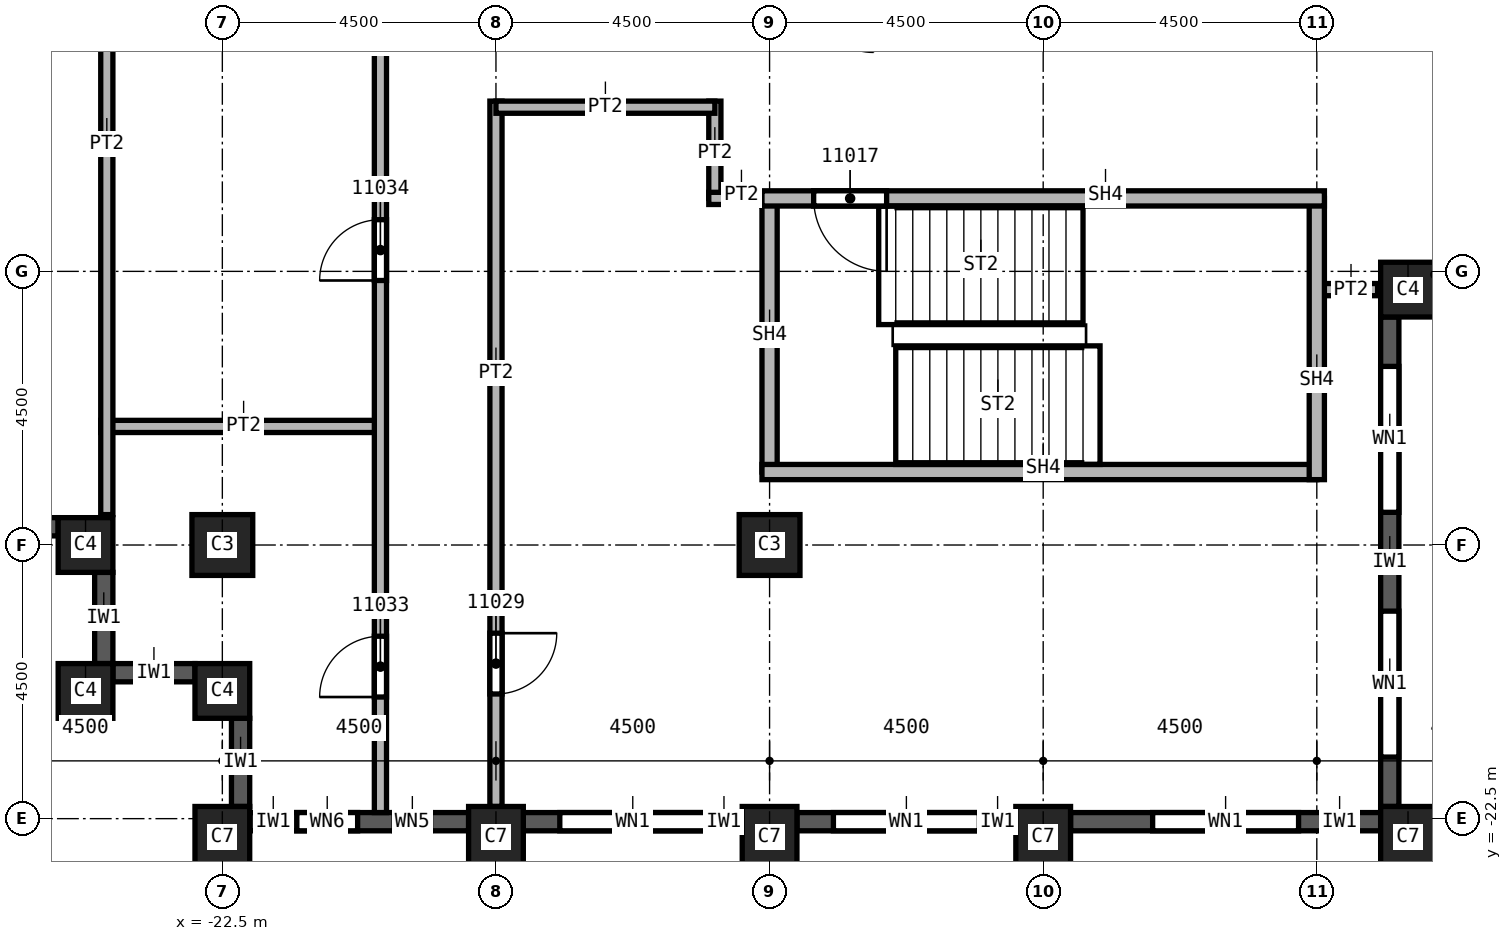
"""IFC4 building model, lengths in metres.
Left out: names, types, materials, properties, quantities, classifications, styles, units other than length and angle.
Written with IfcOpenShell. Run it as: python <this file> out.ifc"""

import sys

from ifc_helpers import new_model, si_unit, direction, frame, frame_2d, origin, origin_2d, place, context, subcontext, project, spatial, rectangle, extrude, element, fill, save


model = new_model("IFC4")
c1 = context("Model", 3, precision=1e-05, world=origin(), true_north=direction((0.0, 1.0)))
c2 = subcontext(c1, "Body", "Model", "MODEL_VIEW")
j1 = project(units=[si_unit("LENGTHUNIT", "METRE"), si_unit("PLANEANGLEUNIT", "RADIAN")], contexts=[c1])
p1 = place(None, origin())
s1 = spatial("IfcSite", under=j1, at=p1, CompositionType="ELEMENT")
p2 = place(p1, origin())
s2 = spatial("IfcBuilding", under=s1, at=p2, CompositionType="ELEMENT")
p3 = place(p2, frame((0.0, 0.0, 188.0)))
s3 = spatial("IfcBuildingStorey", under=s2, at=p3, CompositionType="ELEMENT", Elevation=188.0)
for number, where, z_axis, x_axis in (
    (1, (-13.5, -18.0, 0.0), (0.0, 0.0, 1.0), (1.0, 0.0, 0.0)),
    (2, (-22.5, -18.0, 0.0), (0.0, 0.0, 1.0), (1.0, 0.0, 0.0)),
):
    element("IfcColumn", number, at=place(p3, frame(where, z_axis=z_axis, x_axis=x_axis)), inside=s3, PredefinedType="COLUMN", context=c2, shape_type="SweptSolid", body=[
        extrude(rectangle(XDim=1.0, YDim=1.0, at=origin_2d()), origin(), (0.0, 0.0, 1.0), 3.72),
    ])
for number, where, z_axis, x_axis in (
    (3, (-3.0, -22.8, 0.0), (0.0, 0.0, 1.0), (1.0, 0.0, 0.0)),
    (4, (-9.0, -22.8, 0.0), (0.0, 0.0, 1.0), (1.0, 0.0, 0.0)),
    (5, (-13.5, -22.8, 0.0), (0.0, 0.0, 1.0), (1.0, 0.0, 0.0)),
    (6, (-18.0, -22.8, 0.0), (0.0, 0.0, 1.0), (1.0, 0.0, 0.0)),
    (7, (-22.5, -22.8, 0.0), (0.0, 0.0, 1.0), (1.0, 0.0, 0.0)),
):
    element("IfcColumn", number, at=place(p3, frame(where, z_axis=z_axis, x_axis=x_axis)), inside=s3, PredefinedType="COLUMN", context=c2, shape_type="SweptSolid", body=[
        extrude(rectangle(XDim=0.9, YDim=1.0, at=origin_2d()), origin(), (0.0, 0.0, 1.0), 3.72),
    ])
for number, where, z_axis, x_axis in (
    (8, (-3.0, -13.8, 0.0), (0.0, 0.0, 1.0), (1.0, 0.0, 0.0)),
    (9, (-22.5, -20.4, 0.0), (0.0, 0.0, 1.0), (1.0, 0.0, 0.0)),
    (10, (-24.75, -20.4, 0.0), (0.0, 0.0, 1.0), (1.0, 0.0, 0.0)),
    (11, (-24.75, -18.0, 0.0), (0.0, 0.0, 1.0), (1.0, 0.0, 0.0)),
):
    element("IfcColumn", number, at=place(p3, frame(where, z_axis=z_axis, x_axis=x_axis)), inside=s3, PredefinedType="COLUMN", context=c2, shape_type="SweptSolid", body=[
        extrude(rectangle(XDim=0.9, YDim=0.9, at=origin_2d()), origin(), (0.0, 0.0, 1.0), 3.72),
    ])
p4 = place(p3, frame((-26.55, -17.7, 0.0), z_axis=(0.0, 0.0, 1.0), x_axis=(1.0, 0.0, 0.0)))
e12 = element("IfcWall", 12, at=p4, inside=s3, PredefinedType="SOLIDWALL", context=c2, shape_type="SweptSolid", body=[
    extrude(rectangle(XDim=1.35, YDim=0.3, at=frame_2d((0.675, 0.0))), origin(), (0.0, 0.0, 1.0), 3.12),
])
p5 = place(p3, frame((-24.45, -18.45, 0.0), z_axis=(0.0, 0.0, 1.0), x_axis=(0.0, -1.0, 0.0)))
e13 = element("IfcWall", 13, at=p5, inside=s3, PredefinedType="SOLIDWALL", context=c2, shape_type="SweptSolid", body=[
    extrude(rectangle(XDim=1.5, YDim=0.3, at=frame_2d((0.75, 0.0))), origin(), (0.0, 0.0, 1.0), 3.12),
])
p6 = place(p3, frame((-24.3, -20.1, 0.0), z_axis=(0.0, 0.0, 1.0), x_axis=(1.0, 0.0, 0.0)))
e14 = element("IfcWall", 14, at=p6, inside=s3, PredefinedType="SOLIDWALL", context=c2, shape_type="SweptSolid", body=[
    extrude(rectangle(XDim=1.35, YDim=0.3, at=frame_2d((0.675, 0.0))), origin(), (0.0, 0.0, 1.0), 3.12),
])
p7 = place(p3, frame((-22.2, -20.85, 0.0), z_axis=(0.0, 0.0, 1.0), x_axis=(0.0, -1.0, 0.0)))
e15 = element("IfcWall", 15, at=p7, inside=s3, PredefinedType="SOLIDWALL", context=c2, shape_type="SweptSolid", body=[
    extrude(rectangle(XDim=1.45, YDim=0.3, at=frame_2d((0.725, 0.0))), origin(), (0.0, 0.0, 1.0), 3.12),
])
p8 = place(p3, frame((-22.05, -22.55, 0.0), z_axis=(0.0, 0.0, 1.0), x_axis=(1.0, 0.0, 0.0)))
e16 = element("IfcWall", 16, at=p8, inside=s3, PredefinedType="SOLIDWALL", context=c2, shape_type="SweptSolid", body=[
    extrude(rectangle(XDim=3.6, YDim=0.3, at=frame_2d((1.8, 0.0))), origin(), (0.0, 0.0, 1.0), 3.12),
])
p9 = place(p8, frame((0.775, 0.0, 0.8)))
e17 = element("IfcOpeningElement", 17, at=p9, cuts=e16, PredefinedType="OPENING", context=c2, shape_type="SweptSolid", body=[
    extrude(rectangle(XDim=1.0, YDim=1.95, at=frame_2d((0.5, 0.975))), frame((0.0, 0.15, 0.0), z_axis=(0.0, -1.0, 0.0), x_axis=(1.0, 0.0, 0.0)), (0.0, 0.0, 1.0), 0.3),
])
p10 = place(p8, frame((2.375, 0.0, 0.8)))
e18 = element("IfcOpeningElement", 18, at=p10, cuts=e16, PredefinedType="OPENING", context=c2, shape_type="SweptSolid", body=[
    extrude(rectangle(XDim=0.6, YDim=1.95, at=frame_2d((0.3, 0.975))), frame((0.0, 0.15, 0.0), z_axis=(0.0, -1.0, 0.0), x_axis=(1.0, 0.0, 0.0)), (0.0, 0.0, 1.0), 0.3),
])
p11 = place(p3, frame((-17.55, -22.55, 0.0), z_axis=(0.0, 0.0, 1.0), x_axis=(1.0, 0.0, 0.0)))
e19 = element("IfcWall", 19, at=p11, inside=s3, PredefinedType="SOLIDWALL", context=c2, shape_type="SweptSolid", body=[
    extrude(rectangle(XDim=3.6, YDim=0.3, at=frame_2d((1.8, 0.0))), origin(), (0.0, 0.0, 1.0), 3.12),
])
p12 = place(p11, frame((0.6, 0.0, 0.8)))
e20 = element("IfcOpeningElement", 20, at=p12, cuts=e19, PredefinedType="OPENING", context=c2, shape_type="SweptSolid", body=[
    extrude(rectangle(XDim=2.4, YDim=1.95, at=frame_2d((1.2, 0.975))), frame((0.0, 0.15, 0.0), z_axis=(0.0, -1.0, 0.0), x_axis=(1.0, 0.0, 0.0)), (0.0, 0.0, 1.0), 0.3),
])
p13 = place(p3, frame((-13.05, -22.55, 0.0), z_axis=(0.0, 0.0, 1.0), x_axis=(1.0, 0.0, 0.0)))
e21 = element("IfcWall", 21, at=p13, inside=s3, PredefinedType="SOLIDWALL", context=c2, shape_type="SweptSolid", body=[
    extrude(rectangle(XDim=3.6, YDim=0.3, at=frame_2d((1.8, 0.0))), origin(), (0.0, 0.0, 1.0), 3.12),
])
p14 = place(p13, frame((0.6, 0.0, 0.8)))
e22 = element("IfcOpeningElement", 22, at=p14, cuts=e21, PredefinedType="OPENING", context=c2, shape_type="SweptSolid", body=[
    extrude(rectangle(XDim=2.4, YDim=1.95, at=frame_2d((1.2, 0.975))), frame((0.0, 0.15, 0.0), z_axis=(0.0, -1.0, 0.0), x_axis=(1.0, 0.0, 0.0)), (0.0, 0.0, 1.0), 0.3),
])
p15 = place(p3, frame((-8.55, -22.55, 0.0), z_axis=(0.0, 0.0, 1.0), x_axis=(1.0, 0.0, 0.0)))
e23 = element("IfcWall", 23, at=p15, inside=s3, PredefinedType="SOLIDWALL", context=c2, shape_type="SweptSolid", body=[
    extrude(rectangle(XDim=5.1, YDim=0.3, at=frame_2d((2.55, 0.0))), origin(), (0.0, 0.0, 1.0), 3.12),
])
p16 = place(p15, frame((1.35, 0.0, 0.8)))
e24 = element("IfcOpeningElement", 24, at=p16, cuts=e23, PredefinedType="OPENING", context=c2, shape_type="SweptSolid", body=[
    extrude(rectangle(XDim=2.4, YDim=1.95, at=frame_2d((1.2, 0.975))), frame((0.0, 0.15, 0.0), z_axis=(0.0, -1.0, 0.0), x_axis=(1.0, 0.0, 0.0)), (0.0, 0.0, 1.0), 0.3),
])
p17 = place(p3, frame((-3.3, -22.3, 0.0), z_axis=(0.0, 0.0, 1.0), x_axis=(0.0, 1.0, 0.0)))
e25 = element("IfcWall", 25, at=p17, inside=s3, PredefinedType="SOLIDWALL", context=c2, shape_type="SweptSolid", body=[
    extrude(rectangle(XDim=8.05, YDim=0.3, at=frame_2d((4.025, 0.0))), origin(), (0.0, 0.0, 1.0), 3.12),
])
p18 = place(p17, frame((0.812, 0.0, 0.8)))
e26 = element("IfcOpeningElement", 26, at=p18, cuts=e25, PredefinedType="OPENING", context=c2, shape_type="SweptSolid", body=[
    extrude(rectangle(XDim=2.4, YDim=1.95, at=frame_2d((1.2, 0.975))), frame((0.0, 0.15, 0.0), z_axis=(0.0, -1.0, 0.0), x_axis=(1.0, 0.0, 0.0)), (0.0, 0.0, 1.0), 0.3),
])
p19 = place(p17, frame((4.837, 0.0, 0.8)))
e27 = element("IfcOpeningElement", 27, at=p19, cuts=e25, PredefinedType="OPENING", context=c2, shape_type="SweptSolid", body=[
    extrude(rectangle(XDim=2.4, YDim=1.95, at=frame_2d((1.2, 0.975))), frame((0.0, 0.15, 0.0), z_axis=(0.0, -1.0, 0.0), x_axis=(1.0, 0.0, 0.0)), (0.0, 0.0, 1.0), 0.3),
])
p20 = place(p3, frame((-24.5, -16.05, 0.0), z_axis=(0.0, 0.0, 1.0), x_axis=(1.0, 0.0, 0.0)))
e28 = element("IfcWall", 28, at=p20, inside=s3, PredefinedType="PARTITIONING", context=c2, shape_type="SweptSolid", body=[
    extrude(rectangle(XDim=4.6, YDim=0.2, at=frame_2d((2.3, 0.0))), origin(), (0.0, 0.0, 1.0), 3.72),
])
p21 = place(p3, frame((-24.4, -17.5, 0.0), z_axis=(0.0, 0.0, 1.0), x_axis=(0.0, 1.0, 0.0)))
e29 = element("IfcWall", 29, at=p21, inside=s3, PredefinedType="PARTITIONING", context=c2, shape_type="SweptSolid", body=[
    extrude(rectangle(XDim=10.85, YDim=0.2, at=frame_2d((5.425, 0.0))), origin(), (0.0, 0.0, 1.0), 3.72),
])
p22 = place(p3, frame((-19.9, -22.4, 0.0), z_axis=(0.0, 0.0, 1.0), x_axis=(0.0, 1.0, 0.0)))
e30 = element("IfcWall", 30, at=p22, inside=s3, PredefinedType="PARTITIONING", context=c2, shape_type="SweptSolid", body=[
    extrude(rectangle(XDim=23.25, YDim=0.2, at=frame_2d((11.625, 0.0))), origin(), (0.0, 0.0, 1.0), 3.72),
])
p23 = place(p22, frame((1.9, 0.0, 0.0)))
e31 = element("IfcOpeningElement", 31, at=p23, cuts=e30, PredefinedType="OPENING", context=c2, shape_type="SweptSolid", body=[
    extrude(rectangle(XDim=1.0, YDim=2.1, at=frame_2d((0.5, 1.05))), frame((0.0, 0.1, 0.0), z_axis=(0.0, -1.0, 0.0), x_axis=(1.0, 0.0, 0.0)), (0.0, 0.0, 1.0), 0.2),
])
p24 = place(p22, frame((8.75, 0.0, 0.0)))
e32 = element("IfcOpeningElement", 32, at=p24, cuts=e30, PredefinedType="OPENING", context=c2, shape_type="SweptSolid", body=[
    extrude(rectangle(XDim=1.0, YDim=2.1, at=frame_2d((0.5, 1.05))), frame((0.0, 0.1, 0.0), z_axis=(0.0, -1.0, 0.0), x_axis=(1.0, 0.0, 0.0)), (0.0, 0.0, 1.0), 0.2),
])
p25 = place(p22, frame((16.25, 0.0, 0.0)))
e33 = element("IfcOpeningElement", 33, at=p25, cuts=e30, PredefinedType="OPENING", context=c2, shape_type="SweptSolid", body=[
    extrude(rectangle(XDim=1.0, YDim=2.1, at=frame_2d((0.5, 1.05))), frame((0.0, 0.1, 0.0), z_axis=(0.0, -1.0, 0.0), x_axis=(1.0, 0.0, 0.0)), (0.0, 0.0, 1.0), 0.2),
])
p26 = place(p3, frame((-18.0, -10.7, 0.0), z_axis=(0.0, 0.0, 1.0), x_axis=(0.0, -1.0, 0.0)))
e34 = element("IfcWall", 34, at=p26, inside=s3, PredefinedType="PARTITIONING", context=c2, shape_type="SweptSolid", body=[
    extrude(rectangle(XDim=11.6, YDim=0.2, at=frame_2d((5.8, 0.0))), origin(), (0.0, 0.0, 1.0), 3.72),
])
p27 = place(p26, frame((8.75, 0.0, 0.0)))
e35 = element("IfcOpeningElement", 35, at=p27, cuts=e34, PredefinedType="OPENING", context=c2, shape_type="SweptSolid", body=[
    extrude(rectangle(XDim=1.0, YDim=2.1, at=frame_2d((0.5, 1.05))), frame((0.0, 0.1, 0.0), z_axis=(0.0, -1.0, 0.0), x_axis=(1.0, 0.0, 0.0)), (0.0, 0.0, 1.0), 0.2),
])
p28 = place(p3, frame((-14.4, -12.3, 0.0), z_axis=(0.0, 0.0, 1.0), x_axis=(0.0, 1.0, 0.0)))
e36 = element("IfcWall", 36, at=p28, inside=s3, PredefinedType="PARTITIONING", context=c2, shape_type="SweptSolid", body=[
    extrude(rectangle(XDim=1.6, YDim=0.2, at=frame_2d((0.8, 0.0))), origin(), (0.0, 0.0, 1.0), 3.72),
])
p29 = place(p3, frame((-14.4, -10.8, 0.0), z_axis=(0.0, 0.0, 1.0), x_axis=(-1.0, 0.0, 0.0)))
e37 = element("IfcWall", 37, at=p29, inside=s3, PredefinedType="PARTITIONING", context=c2, shape_type="SweptSolid", body=[
    extrude(rectangle(XDim=3.6, YDim=0.2, at=frame_2d((1.8, 0.0))), origin(), (0.0, 0.0, 1.0), 3.72),
])
p30 = place(p3, frame((-13.375, -12.3, 0.0), z_axis=(0.0, 0.0, 1.0), x_axis=(-1.0, 0.0, 0.0)))
e38 = element("IfcWall", 38, at=p30, inside=s3, PredefinedType="PARTITIONING", context=c2, shape_type="SweptSolid", body=[
    extrude(rectangle(XDim=1.125, YDim=0.2, at=frame_2d((0.562, 0.0))), origin(), (0.0, 0.0, 1.0), 3.72),
])
p31 = place(p3, frame((-3.5, -13.8, 0.0), z_axis=(0.0, 0.0, 1.0), x_axis=(-1.0, 0.0, 0.0)))
e39 = element("IfcWall", 39, at=p31, inside=s3, PredefinedType="PARTITIONING", context=c2, shape_type="SweptSolid", body=[
    extrude(rectangle(XDim=1.0, YDim=0.2, at=frame_2d((0.5, 0.0))), origin(), (0.0, 0.0, 1.0), 3.72),
])
p32 = place(p3, frame((-13.5, -16.8, 0.0), z_axis=(0.0, 0.0, 1.0), x_axis=(0.0, 1.0, 0.0)))
e40 = element("IfcWall", 40, at=p32, inside=s3, PredefinedType="SOLIDWALL", context=c2, shape_type="SweptSolid", body=[
    extrude(rectangle(XDim=4.5, YDim=0.25, at=frame_2d((2.25, 0.0))), origin(), (0.0, 0.0, 1.0), 3.72),
])
p33 = place(p3, frame((-4.5, -16.8, 0.0), z_axis=(0.0, 0.0, 1.0), x_axis=(-1.0, 0.0, 0.0)))
e41 = element("IfcWall", 41, at=p33, inside=s3, PredefinedType="SOLIDWALL", context=c2, shape_type="SweptSolid", body=[
    extrude(rectangle(XDim=9.125, YDim=0.25, at=frame_2d((4.562, 0.0))), origin(), (0.0, 0.0, 1.0), 3.72),
])
p34 = place(p3, frame((-4.5, -12.3, 0.0), z_axis=(0.0, 0.0, 1.0), x_axis=(0.0, -1.0, 0.0)))
e42 = element("IfcWall", 42, at=p34, inside=s3, PredefinedType="SOLIDWALL", context=c2, shape_type="SweptSolid", body=[
    extrude(rectangle(XDim=4.625, YDim=0.25, at=frame_2d((2.312, 0.0))), origin(), (0.0, 0.0, 1.0), 3.72),
])
p35 = place(p3, frame((-4.375, -12.3, 0.0), z_axis=(0.0, 0.0, 1.0), x_axis=(-1.0, 0.0, 0.0)))
e43 = element("IfcWall", 43, at=p35, inside=s3, PredefinedType="SOLIDWALL", context=c2, shape_type="SweptSolid", body=[
    extrude(rectangle(XDim=9.25, YDim=0.25, at=frame_2d((4.625, 0.0))), origin(), (0.0, 0.0, 1.0), 3.72),
])
p36 = place(p35, frame((7.2, 0.0, 0.0)))
e44 = element("IfcOpeningElement", 44, at=p36, cuts=e43, PredefinedType="OPENING", context=c2, shape_type="SweptSolid", body=[
    extrude(rectangle(XDim=1.2, YDim=2.1, at=frame_2d((0.6, 1.05))), frame((0.0, 0.125, 0.0), z_axis=(0.0, -1.0, 0.0), x_axis=(1.0, 0.0, 0.0)), (0.0, 0.0, 1.0), 0.25),
])
p37 = place(p12, origin())
e45 = element("IfcWindow", 45, at=p37, inside=s3, PartitioningType="SINGLE_PANEL", PredefinedType="WINDOW", context=c2, shape_type="SweptSolid", body=[
    extrude(rectangle(XDim=2.4, YDim=1.95, at=frame_2d((1.2, 0.975))), frame((0.0, 0.03, 0.0), z_axis=(0.0, -1.0, 0.0), x_axis=(1.0, 0.0, 0.0)), (0.0, 0.0, 1.0), 0.06),
])
fill(e20, e45)
p38 = place(p14, origin())
e46 = element("IfcWindow", 46, at=p38, inside=s3, PartitioningType="SINGLE_PANEL", PredefinedType="WINDOW", context=c2, shape_type="SweptSolid", body=[
    extrude(rectangle(XDim=2.4, YDim=1.95, at=frame_2d((1.2, 0.975))), frame((0.0, 0.03, 0.0), z_axis=(0.0, -1.0, 0.0), x_axis=(1.0, 0.0, 0.0)), (0.0, 0.0, 1.0), 0.06),
])
fill(e22, e46)
p39 = place(p16, origin())
e47 = element("IfcWindow", 47, at=p39, inside=s3, PartitioningType="SINGLE_PANEL", PredefinedType="WINDOW", context=c2, shape_type="SweptSolid", body=[
    extrude(rectangle(XDim=2.4, YDim=1.95, at=frame_2d((1.2, 0.975))), frame((0.0, 0.03, 0.0), z_axis=(0.0, -1.0, 0.0), x_axis=(1.0, 0.0, 0.0)), (0.0, 0.0, 1.0), 0.06),
])
fill(e24, e47)
p40 = place(p18, origin())
e48 = element("IfcWindow", 48, at=p40, inside=s3, PartitioningType="SINGLE_PANEL", PredefinedType="WINDOW", context=c2, shape_type="SweptSolid", body=[
    extrude(rectangle(XDim=2.4, YDim=1.95, at=frame_2d((1.2, 0.975))), frame((0.0, 0.03, 0.0), z_axis=(0.0, -1.0, 0.0), x_axis=(1.0, 0.0, 0.0)), (0.0, 0.0, 1.0), 0.06),
])
fill(e26, e48)
p41 = place(p19, origin())
e49 = element("IfcWindow", 49, at=p41, inside=s3, PartitioningType="SINGLE_PANEL", PredefinedType="WINDOW", context=c2, shape_type="SweptSolid", body=[
    extrude(rectangle(XDim=2.4, YDim=1.95, at=frame_2d((1.2, 0.975))), frame((0.0, 0.03, 0.0), z_axis=(0.0, -1.0, 0.0), x_axis=(1.0, 0.0, 0.0)), (0.0, 0.0, 1.0), 0.06),
])
fill(e27, e49)
p42 = place(p36, origin())
e50 = element("IfcDoor", 50, at=p42, inside=s3, OperationType="SINGLE_SWING_RIGHT", PredefinedType="DOOR", context=c2, shape_type="SweptSolid", body=[
    extrude(rectangle(XDim=1.2, YDim=2.1, at=frame_2d((0.6, 1.05))), frame((0.0, 0.025, 0.0), z_axis=(0.0, -1.0, 0.0), x_axis=(1.0, 0.0, 0.0)), (0.0, 0.0, 1.0), 0.05),
])
fill(e44, e50)
p43 = place(p27, origin())
e51 = element("IfcDoor", 51, at=p43, inside=s3, OperationType="SINGLE_SWING_RIGHT", PredefinedType="DOOR", context=c2, shape_type="SweptSolid", body=[
    extrude(rectangle(XDim=1.0, YDim=2.1, at=frame_2d((0.5, 1.05))), frame((0.0, 0.025, 0.0), z_axis=(0.0, -1.0, 0.0), x_axis=(1.0, 0.0, 0.0)), (0.0, 0.0, 1.0), 0.05),
])
fill(e35, e51)
p44 = place(p23, origin())
e52 = element("IfcDoor", 52, at=p44, inside=s3, OperationType="SINGLE_SWING_RIGHT", PredefinedType="DOOR", context=c2, shape_type="SweptSolid", body=[
    extrude(rectangle(XDim=1.0, YDim=2.1, at=frame_2d((0.5, 1.05))), frame((0.0, 0.025, 0.0), z_axis=(0.0, -1.0, 0.0), x_axis=(1.0, 0.0, 0.0)), (0.0, 0.0, 1.0), 0.05),
])
fill(e31, e52)
p45 = place(p24, origin())
e53 = element("IfcDoor", 53, at=p45, inside=s3, OperationType="SINGLE_SWING_LEFT", PredefinedType="DOOR", context=c2, shape_type="SweptSolid", body=[
    extrude(rectangle(XDim=1.0, YDim=2.1, at=frame_2d((0.5, 1.05))), frame((0.0, 0.025, 0.0), z_axis=(0.0, -1.0, 0.0), x_axis=(1.0, 0.0, 0.0)), (0.0, 0.0, 1.0), 0.05),
])
fill(e32, e53)
p46 = place(p9, origin())
e54 = element("IfcWindow", 54, at=p46, inside=s3, PartitioningType="SINGLE_PANEL", PredefinedType="WINDOW", context=c2, shape_type="SweptSolid", body=[
    extrude(rectangle(XDim=1.0, YDim=1.95, at=frame_2d((0.5, 0.975))), frame((0.0, 0.03, 0.0), z_axis=(0.0, -1.0, 0.0), x_axis=(1.0, 0.0, 0.0)), (0.0, 0.0, 1.0), 0.06),
])
fill(e17, e54)
p47 = place(p10, origin())
e55 = element("IfcWindow", 55, at=p47, inside=s3, PartitioningType="SINGLE_PANEL", PredefinedType="WINDOW", context=c2, shape_type="SweptSolid", body=[
    extrude(rectangle(XDim=0.6, YDim=1.95, at=frame_2d((0.3, 0.975))), frame((0.0, 0.03, 0.0), z_axis=(0.0, -1.0, 0.0), x_axis=(1.0, 0.0, 0.0)), (0.0, 0.0, 1.0), 0.06),
])
fill(e18, e55)
save(model, sys.argv[1])
